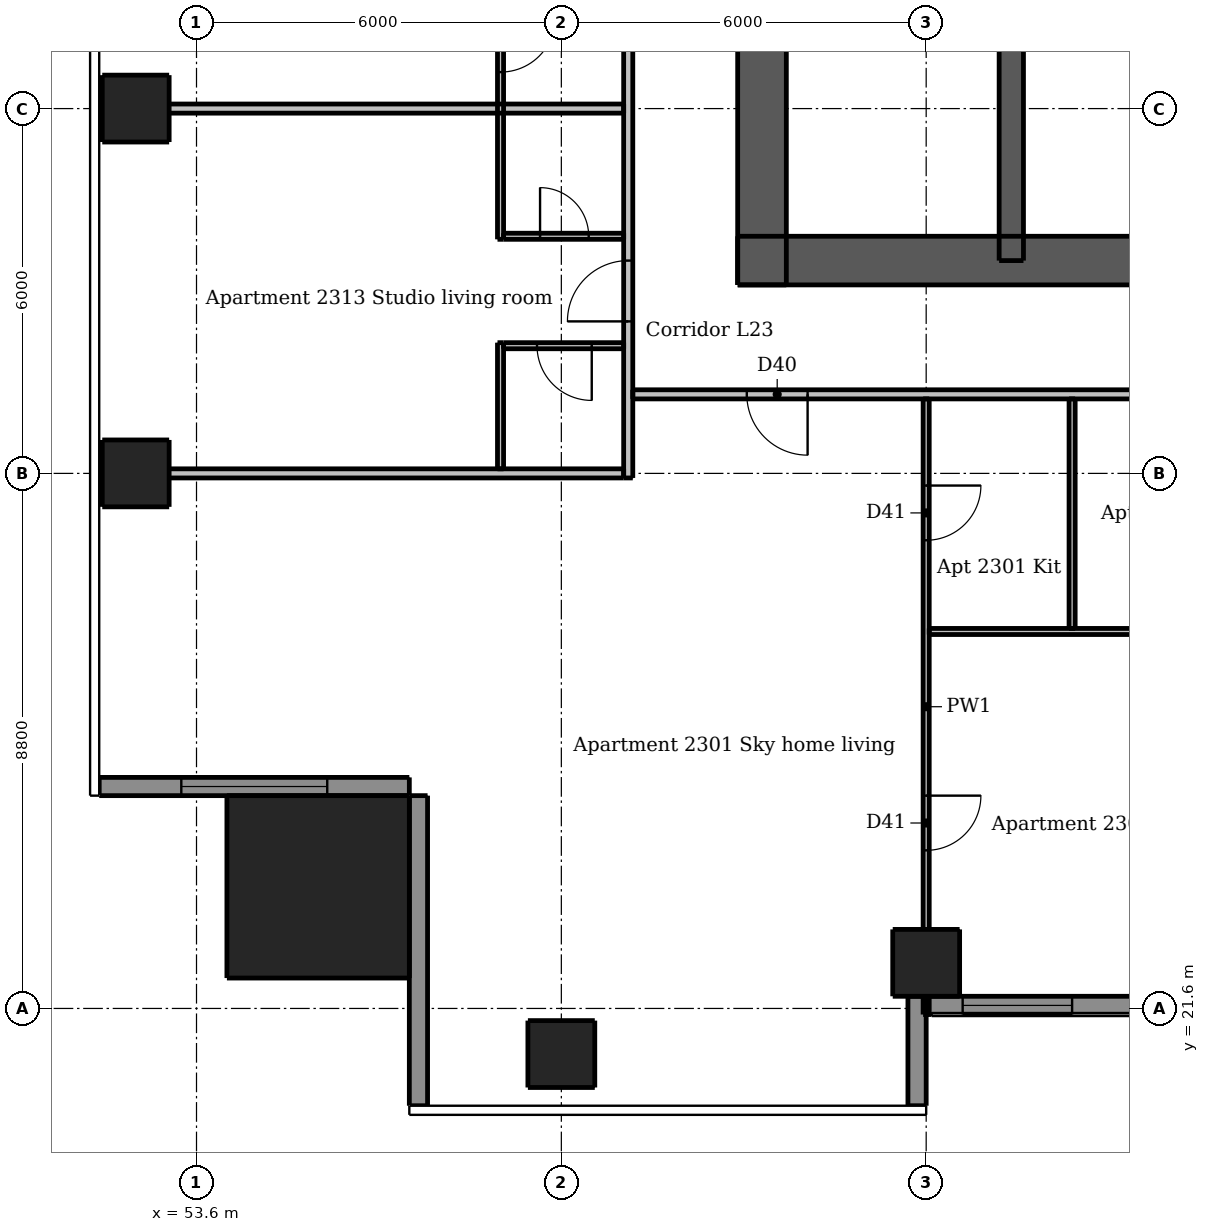
"""IFC4 building model, lengths in metres.
Left out: names, types, materials, properties, quantities, classifications, styles, units other than length and angle.
Written with IfcOpenShell. Run it as: python <this file> out.ifc"""

import sys

from ifc_helpers import new_model, si_unit, direction, frame, frame_2d, origin, origin_2d, place, context, subcontext, project, spatial, rectangle, extrude, element, fill, save


model = new_model("IFC4")
c1 = context("Model", 3, precision=1e-05, world=origin(), true_north=direction((0.0, 1.0)))
c2 = subcontext(c1, "Body", "Model", "MODEL_VIEW")
j1 = project(units=[si_unit("LENGTHUNIT", "METRE"), si_unit("PLANEANGLEUNIT", "RADIAN")], contexts=[c1])
p1 = place(None, origin())
s1 = spatial("IfcSite", under=j1, at=p1, CompositionType="ELEMENT")
p2 = place(p1, origin())
s2 = spatial("IfcBuilding", under=s1, at=p2, CompositionType="ELEMENT")
p3 = place(p2, frame((0.0, 0.0, 88.6)))
s3 = spatial("IfcBuildingStorey", under=s2, at=p3, CompositionType="ELEMENT", Elevation=88.6)
p4 = place(p3, frame((62.5, 33.9, 0.0), z_axis=(0.0, 0.0, 1.0), x_axis=(1.0, 0.0, 0.0)))
e1 = element("IfcWall", 1, at=p4, inside=s3, PredefinedType="SHEAR", context=c2, shape_type="SweptSolid", body=[
    extrude(rectangle(XDim=24.0, YDim=0.8, at=frame_2d((12.0, 0.0))), origin(), (0.0, 0.0, 1.0), 3.05),
])
p5 = place(p4, frame((2.0, 0.0, 0.0)))
e2 = element("IfcOpeningElement", 2, at=p5, cuts=e1, PredefinedType="OPENING", context=c2, shape_type="SweptSolid", body=[
    extrude(rectangle(XDim=1.1, YDim=2.1, at=frame_2d((0.55, 1.05))), frame((0.0, 0.41, 0.0), z_axis=(0.0, -1.0, 0.0), x_axis=(1.0, 0.0, 0.0)), (0.0, 0.0, 1.0), 0.82),
])
p6 = place(p4, frame((20.9, 0.0, 0.0)))
e3 = element("IfcOpeningElement", 3, at=p6, cuts=e1, PredefinedType="OPENING", context=c2, shape_type="SweptSolid", body=[
    extrude(rectangle(XDim=1.1, YDim=2.1, at=frame_2d((0.55, 1.05))), frame((0.0, 0.41, 0.0), z_axis=(0.0, -1.0, 0.0), x_axis=(1.0, 0.0, 0.0)), (0.0, 0.0, 1.0), 0.82),
])
p7 = place(p4, frame((8.0, 0.0, 0.0)))
e4 = element("IfcOpeningElement", 4, at=p7, cuts=e1, PredefinedType="OPENING", context=c2, shape_type="SweptSolid", body=[
    extrude(rectangle(XDim=1.1, YDim=2.1, at=frame_2d((0.55, 1.05))), frame((0.0, 0.41, 0.0), z_axis=(0.0, -1.0, 0.0), x_axis=(1.0, 0.0, 0.0)), (0.0, 0.0, 1.0), 0.82),
])
p8 = place(p4, frame((13.525, 0.0, 0.0)))
e5 = element("IfcOpeningElement", 5, at=p8, cuts=e1, PredefinedType="OPENING", context=c2, shape_type="SweptSolid", body=[
    extrude(rectangle(XDim=0.9, YDim=2.1, at=frame_2d((0.45, 1.05))), frame((0.0, 0.41, 0.0), z_axis=(0.0, -1.0, 0.0), x_axis=(1.0, 0.0, 0.0)), (0.0, 0.0, 1.0), 0.82),
])
p9 = place(p4, frame((17.075, 0.0, 0.0)))
e6 = element("IfcOpeningElement", 6, at=p9, cuts=e1, PredefinedType="OPENING", context=c2, shape_type="SweptSolid", body=[
    extrude(rectangle(XDim=0.9, YDim=2.1, at=frame_2d((0.45, 1.05))), frame((0.0, 0.41, 0.0), z_axis=(0.0, -1.0, 0.0), x_axis=(1.0, 0.0, 0.0)), (0.0, 0.0, 1.0), 0.82),
])
p10 = place(p3, frame((62.9, 33.5, 0.0), z_axis=(0.0, 0.0, 1.0), x_axis=(0.0, 1.0, 0.0)))
e7 = element("IfcWall", 7, at=p10, inside=s3, PredefinedType="SHEAR", context=c2, shape_type="SweptSolid", body=[
    extrude(rectangle(XDim=24.0, YDim=0.8, at=frame_2d((12.0, 0.0))), origin(), (0.0, 0.0, 1.0), 3.05),
])
p11 = place(p10, frame((11.2, 0.0, 0.0)))
e8 = element("IfcOpeningElement", 8, at=p11, cuts=e7, PredefinedType="OPENING", context=c2, shape_type="SweptSolid", body=[
    extrude(rectangle(XDim=1.6, YDim=2.1, at=frame_2d((0.8, 1.05))), frame((0.0, 0.41, 0.0), z_axis=(0.0, -1.0, 0.0), x_axis=(1.0, 0.0, 0.0)), (0.0, 0.0, 1.0), 0.82),
])
p12 = place(p3, frame((67.0, 33.9, 0.0), z_axis=(0.0, 0.0, 1.0), x_axis=(0.0, 1.0, 0.0)))
e9 = element("IfcWall", 9, at=p12, inside=s3, PredefinedType="SHEAR", context=c2, shape_type="SweptSolid", body=[
    extrude(rectangle(XDim=10.0, YDim=0.4, at=frame_2d((5.0, 0.0))), origin(), (0.0, 0.0, 1.0), 3.05),
])
p13 = place(p12, frame((0.6, 0.0, 0.0)))
e10 = element("IfcOpeningElement", 10, at=p13, cuts=e9, PredefinedType="OPENING", context=c2, shape_type="SweptSolid", body=[
    extrude(rectangle(XDim=1.1, YDim=2.1, at=frame_2d((0.55, 1.05))), frame((0.0, 0.21, 0.0), z_axis=(0.0, -1.0, 0.0), x_axis=(1.0, 0.0, 0.0)), (0.0, 0.0, 1.0), 0.42),
])
for number, where, z_axis, x_axis in (
    (11, (59.6, 20.85, 0.0), (0.0, 0.0, 1.0), (1.0, 0.0, 0.0)),
    (12, (65.6, 22.35, 0.0), (0.0, 0.0, 1.0), (1.0, 0.0, 0.0)),
    (13, (52.6, 30.4, 0.0), (0.0, 0.0, 1.0), (1.0, 0.0, 0.0)),
    (14, (52.6, 36.4, 0.0), (0.0, 0.0, 1.0), (1.0, 0.0, 0.0)),
):
    element("IfcColumn", number, at=place(p3, frame(where, z_axis=z_axis, x_axis=x_axis)), inside=s3, PredefinedType="COLUMN", context=c2, shape_type="SweptSolid", body=[
        extrude(rectangle(XDim=1.1, YDim=1.1, at=origin_2d()), origin(), (0.0, 0.0, 1.0), 3.05),
    ])
p14 = place(p3, frame((55.6, 23.6, 0.0), z_axis=(0.0, 0.0, 1.0), x_axis=(1.0, 0.0, 0.0)))
e15 = element("IfcColumn", 15, at=p14, inside=s3, PredefinedType="COLUMN", context=c2, shape_type="SweptSolid", body=[
    extrude(rectangle(XDim=3.0, YDim=3.0, at=origin_2d()), origin(), (0.0, 0.0, 1.0), 3.3),
])
p15 = place(p3, frame((65.45, 20.0, 0.0), z_axis=(0.0, 0.0, 1.0), x_axis=(0.0, 1.0, 0.0)))
e16 = element("IfcWall", 16, at=p15, inside=s3, PredefinedType="SOLIDWALL", context=c2, shape_type="SweptSolid", body=[
    extrude(rectangle(XDim=1.8, YDim=0.3, at=frame_2d((0.9, 0.0))), origin(), (0.0, 0.0, 1.0), 3.05),
])
p16 = place(p3, frame((52.0, 25.25, 0.0), z_axis=(0.0, 0.0, 1.0), x_axis=(1.0, 0.0, 0.0)))
e17 = element("IfcWall", 17, at=p16, inside=s3, PredefinedType="SOLIDWALL", context=c2, shape_type="SweptSolid", body=[
    extrude(rectangle(XDim=5.1, YDim=0.3, at=frame_2d((2.55, 0.0))), origin(), (0.0, 0.0, 1.0), 3.05),
])
p17 = place(p16, frame((1.35, 0.0, 0.15)))
e18 = element("IfcOpeningElement", 18, at=p17, cuts=e17, PredefinedType="OPENING", context=c2, shape_type="SweptSolid", body=[
    extrude(rectangle(XDim=2.4, YDim=2.1, at=frame_2d((1.2, 1.05))), frame((0.0, 0.16, 0.0), z_axis=(0.0, -1.0, 0.0), x_axis=(1.0, 0.0, 0.0)), (0.0, 0.0, 1.0), 0.32),
])
p18 = place(p3, frame((57.25, 25.1, 0.0), z_axis=(0.0, 0.0, 1.0), x_axis=(0.0, -1.0, 0.0)))
e19 = element("IfcWall", 19, at=p18, inside=s3, PredefinedType="SOLIDWALL", context=c2, shape_type="SweptSolid", body=[
    extrude(rectangle(XDim=5.1, YDim=0.3, at=frame_2d((2.55, 0.0))), origin(), (0.0, 0.0, 1.0), 3.05),
])
p19 = place(p3, frame((65.6, 21.65, 0.0), z_axis=(0.0, 0.0, 1.0), x_axis=(1.0, 0.0, 0.0)))
e20 = element("IfcWall", 20, at=p19, inside=s3, PredefinedType="SOLIDWALL", context=c2, shape_type="SweptSolid", body=[
    extrude(rectangle(XDim=5.7, YDim=0.3, at=frame_2d((2.85, 0.0))), origin(), (0.0, 0.0, 1.0), 3.05),
])
p20 = place(p19, frame((0.6, 0.0, 0.15)))
e21 = element("IfcOpeningElement", 21, at=p20, cuts=e20, PredefinedType="OPENING", context=c2, shape_type="SweptSolid", body=[
    extrude(rectangle(XDim=1.8, YDim=2.1, at=frame_2d((0.9, 1.05))), frame((0.0, 0.16, 0.0), z_axis=(0.0, -1.0, 0.0), x_axis=(1.0, 0.0, 0.0)), (0.0, 0.0, 1.0), 0.32),
])
p21 = place(p19, frame((3.6, 0.0, 0.15)))
e22 = element("IfcOpeningElement", 22, at=p21, cuts=e20, PredefinedType="OPENING", context=c2, shape_type="SweptSolid", body=[
    extrude(rectangle(XDim=1.8, YDim=2.1, at=frame_2d((0.9, 1.05))), frame((0.0, 0.16, 0.0), z_axis=(0.0, -1.0, 0.0), x_axis=(1.0, 0.0, 0.0)), (0.0, 0.0, 1.0), 0.32),
])
p22 = place(p3, frame((58.6, 30.475, 0.0), z_axis=(0.0, 0.0, 1.0), x_axis=(0.0, 1.0, 0.0)))
e23 = element("IfcWall", 23, at=p22, inside=s3, PredefinedType="PARTITIONING", context=c2, shape_type="SweptSolid", body=[
    extrude(rectangle(XDim=2.075, YDim=0.1, at=frame_2d((1.038, 0.0))), origin(), (0.0, 0.0, 1.0), 3.05),
])
p23 = place(p3, frame((58.6, 38.55, 0.0), z_axis=(0.0, 0.0, 1.0), x_axis=(0.0, -1.0, 0.0)))
e24 = element("IfcWall", 24, at=p23, inside=s3, PredefinedType="PARTITIONING", context=c2, shape_type="SweptSolid", body=[
    extrude(rectangle(XDim=4.3, YDim=0.1, at=frame_2d((2.15, 0.0))), origin(), (0.0, 0.0, 1.0), 3.05),
])
p24 = place(p23, frame((0.65, 0.0, 0.0)))
e25 = element("IfcOpeningElement", 25, at=p24, cuts=e24, PredefinedType="OPENING", context=c2, shape_type="SweptSolid", body=[
    extrude(rectangle(XDim=0.9, YDim=2.1, at=frame_2d((0.45, 1.05))), frame((0.0, 0.06, 0.0), z_axis=(0.0, -1.0, 0.0), x_axis=(1.0, 0.0, 0.0)), (0.0, 0.0, 1.0), 0.12),
])
p25 = place(p3, frame((65.6, 31.625, 0.0), z_axis=(0.0, 0.0, 1.0), x_axis=(0.0, -1.0, 0.0)))
e26 = element("IfcWall", 26, at=p25, inside=s3, PredefinedType="PARTITIONING", context=c2, shape_type="SweptSolid", body=[
    extrude(rectangle(XDim=10.125, YDim=0.1, at=frame_2d((5.062, 0.0))), origin(), (0.0, 0.0, 1.0), 2.516),
])
p26 = place(p25, frame((1.425, 0.0, 0.0)))
e27 = element("IfcOpeningElement", 27, at=p26, cuts=e26, PredefinedType="OPENING", context=c2, shape_type="SweptSolid", body=[
    extrude(rectangle(XDim=0.9, YDim=2.1, at=frame_2d((0.45, 1.05))), frame((0.0, 0.06, 0.0), z_axis=(0.0, -1.0, 0.0), x_axis=(1.0, 0.0, 0.0)), (0.0, 0.0, 1.0), 0.12),
])
p27 = place(p25, frame((6.525, 0.0, 0.0)))
e28 = element("IfcOpeningElement", 28, at=p27, cuts=e26, PredefinedType="OPENING", context=c2, shape_type="SweptSolid", body=[
    extrude(rectangle(XDim=0.9, YDim=2.1, at=frame_2d((0.45, 1.05))), frame((0.0, 0.06, 0.0), z_axis=(0.0, -1.0, 0.0), x_axis=(1.0, 0.0, 0.0)), (0.0, 0.0, 1.0), 0.12),
])
p28 = place(p3, frame((68.0, 27.85, 0.0), z_axis=(0.0, 0.0, 1.0), x_axis=(0.0, 1.0, 0.0)))
e29 = element("IfcWall", 29, at=p28, inside=s3, PredefinedType="PARTITIONING", context=c2, shape_type="SweptSolid", body=[
    extrude(rectangle(XDim=3.775, YDim=0.1, at=frame_2d((1.887, 0.0))), origin(), (0.0, 0.0, 1.0), 3.05),
])
p29 = place(p3, frame((58.65, 34.3, 0.0), z_axis=(0.0, 0.0, 1.0), x_axis=(1.0, 0.0, 0.0)))
e30 = element("IfcWall", 30, at=p29, inside=s3, PredefinedType="PARTITIONING", context=c2, shape_type="SweptSolid", body=[
    extrude(rectangle(XDim=1.975, YDim=0.1, at=frame_2d((0.988, 0.0))), origin(), (0.0, 0.0, 1.0), 3.05),
])
p30 = place(p29, frame((0.6, 0.0, 0.0)))
e31 = element("IfcOpeningElement", 31, at=p30, cuts=e30, PredefinedType="OPENING", context=c2, shape_type="SweptSolid", body=[
    extrude(rectangle(XDim=0.8, YDim=2.1, at=frame_2d((0.4, 1.05))), frame((0.0, 0.06, 0.0), z_axis=(0.0, -1.0, 0.0), x_axis=(1.0, 0.0, 0.0)), (0.0, 0.0, 1.0), 0.12),
])
p31 = place(p3, frame((60.625, 32.5, 0.0), z_axis=(0.0, 0.0, 1.0), x_axis=(-1.0, 0.0, 0.0)))
e32 = element("IfcWall", 32, at=p31, inside=s3, PredefinedType="PARTITIONING", context=c2, shape_type="SweptSolid", body=[
    extrude(rectangle(XDim=1.975, YDim=0.1, at=frame_2d((0.988, 0.0))), origin(), (0.0, 0.0, 1.0), 3.05),
])
p32 = place(p31, frame((0.525, 0.0, 0.0)))
e33 = element("IfcOpeningElement", 33, at=p32, cuts=e32, PredefinedType="OPENING", context=c2, shape_type="SweptSolid", body=[
    extrude(rectangle(XDim=0.9, YDim=2.1, at=frame_2d((0.45, 1.05))), frame((0.0, 0.06, 0.0), z_axis=(0.0, -1.0, 0.0), x_axis=(1.0, 0.0, 0.0)), (0.0, 0.0, 1.0), 0.12),
])
p33 = place(p3, frame((65.65, 27.8, 0.0), z_axis=(0.0, 0.0, 1.0), x_axis=(1.0, 0.0, 0.0)))
e34 = element("IfcWall", 34, at=p33, inside=s3, PredefinedType="PARTITIONING", context=c2, shape_type="SweptSolid", body=[
    extrude(rectangle(XDim=5.875, YDim=0.1, at=frame_2d((2.938, 0.0))), origin(), (0.0, 0.0, 1.0), 3.05),
])
p34 = place(p33, frame((3.75, 0.0, 0.0)))
e35 = element("IfcOpeningElement", 35, at=p34, cuts=e34, PredefinedType="OPENING", context=c2, shape_type="SweptSolid", body=[
    extrude(rectangle(XDim=0.8, YDim=2.1, at=frame_2d((0.4, 1.05))), frame((0.0, 0.06, 0.0), z_axis=(0.0, -1.0, 0.0), x_axis=(1.0, 0.0, 0.0)), (0.0, 0.0, 1.0), 0.12),
])
p35 = place(p3, frame((60.7, 30.325, 0.0), z_axis=(0.0, 0.0, 1.0), x_axis=(0.0, 1.0, 0.0)))
e36 = element("IfcWall", 36, at=p35, inside=s3, PredefinedType="PARTITIONING", context=c2, shape_type="SweptSolid", body=[
    extrude(rectangle(XDim=28.9, YDim=0.15, at=frame_2d((14.45, 0.0))), origin(), (0.0, 0.0, 1.0), 3.05),
])
p36 = place(p35, frame((2.575, 0.0, 0.0)))
e37 = element("IfcOpeningElement", 37, at=p36, cuts=e36, PredefinedType="OPENING", context=c2, shape_type="SweptSolid", body=[
    extrude(rectangle(XDim=1.0, YDim=2.1, at=frame_2d((0.5, 1.05))), frame((0.0, 0.085, 0.0), z_axis=(0.0, -1.0, 0.0), x_axis=(1.0, 0.0, 0.0)), (0.0, 0.0, 1.0), 0.17),
])
p37 = place(p35, frame((8.575, 0.0, 0.0)))
e38 = element("IfcOpeningElement", 38, at=p37, cuts=e36, PredefinedType="OPENING", context=c2, shape_type="SweptSolid", body=[
    extrude(rectangle(XDim=1.0, YDim=2.1, at=frame_2d((0.5, 1.05))), frame((0.0, 0.085, 0.0), z_axis=(0.0, -1.0, 0.0), x_axis=(1.0, 0.0, 0.0)), (0.0, 0.0, 1.0), 0.17),
])
p38 = place(p35, frame((14.575, 0.0, 0.0)))
e39 = element("IfcOpeningElement", 39, at=p38, cuts=e36, PredefinedType="OPENING", context=c2, shape_type="SweptSolid", body=[
    extrude(rectangle(XDim=1.0, YDim=2.1, at=frame_2d((0.5, 1.05))), frame((0.0, 0.085, 0.0), z_axis=(0.0, -1.0, 0.0), x_axis=(1.0, 0.0, 0.0)), (0.0, 0.0, 1.0), 0.17),
])
p39 = place(p35, frame((26.025, 0.0, 0.0)))
e40 = element("IfcOpeningElement", 40, at=p39, cuts=e36, PredefinedType="OPENING", context=c2, shape_type="SweptSolid", body=[
    extrude(rectangle(XDim=1.0, YDim=2.1, at=frame_2d((0.5, 1.05))), frame((0.0, 0.085, 0.0), z_axis=(0.0, -1.0, 0.0), x_axis=(1.0, 0.0, 0.0)), (0.0, 0.0, 1.0), 0.17),
])
p40 = place(p3, frame((52.0, 36.4, 0.0), z_axis=(0.0, 0.0, 1.0), x_axis=(1.0, 0.0, 0.0)))
e41 = element("IfcWall", 41, at=p40, inside=s3, PredefinedType="PARTITIONING", context=c2, shape_type="SweptSolid", body=[
    extrude(rectangle(XDim=8.625, YDim=0.15, at=frame_2d((4.312, 0.0))), origin(), (0.0, 0.0, 1.0), 2.516),
])
p41 = place(p3, frame((89.525, 31.7, 0.0), z_axis=(0.0, 0.0, 1.0), x_axis=(-1.0, 0.0, 0.0)))
e42 = element("IfcWall", 42, at=p41, inside=s3, PredefinedType="PARTITIONING", context=c2, shape_type="SweptSolid", body=[
    extrude(rectangle(XDim=28.75, YDim=0.15, at=frame_2d((14.375, 0.0))), origin(), (0.0, 0.0, 1.0), 3.05),
])
p42 = place(p41, frame((25.875, 0.0, 0.0)))
e43 = element("IfcOpeningElement", 43, at=p42, cuts=e42, PredefinedType="OPENING", context=c2, shape_type="SweptSolid", body=[
    extrude(rectangle(XDim=1.0, YDim=2.1, at=frame_2d((0.5, 1.05))), frame((0.0, 0.085, 0.0), z_axis=(0.0, -1.0, 0.0), x_axis=(1.0, 0.0, 0.0)), (0.0, 0.0, 1.0), 0.17),
])
p43 = place(p41, frame((14.425, 0.0, 0.0)))
e44 = element("IfcOpeningElement", 44, at=p43, cuts=e42, PredefinedType="OPENING", context=c2, shape_type="SweptSolid", body=[
    extrude(rectangle(XDim=1.0, YDim=2.1, at=frame_2d((0.5, 1.05))), frame((0.0, 0.085, 0.0), z_axis=(0.0, -1.0, 0.0), x_axis=(1.0, 0.0, 0.0)), (0.0, 0.0, 1.0), 0.17),
])
p44 = place(p41, frame((8.425, 0.0, 0.0)))
e45 = element("IfcOpeningElement", 45, at=p44, cuts=e42, PredefinedType="OPENING", context=c2, shape_type="SweptSolid", body=[
    extrude(rectangle(XDim=1.0, YDim=2.1, at=frame_2d((0.5, 1.05))), frame((0.0, 0.085, 0.0), z_axis=(0.0, -1.0, 0.0), x_axis=(1.0, 0.0, 0.0)), (0.0, 0.0, 1.0), 0.17),
])
p45 = place(p41, frame((2.425, 0.0, 0.0)))
e46 = element("IfcOpeningElement", 46, at=p45, cuts=e42, PredefinedType="OPENING", context=c2, shape_type="SweptSolid", body=[
    extrude(rectangle(XDim=1.0, YDim=2.1, at=frame_2d((0.5, 1.05))), frame((0.0, 0.085, 0.0), z_axis=(0.0, -1.0, 0.0), x_axis=(1.0, 0.0, 0.0)), (0.0, 0.0, 1.0), 0.17),
])
p46 = place(p3, frame((52.0, 30.4, 0.0), z_axis=(0.0, 0.0, 1.0), x_axis=(1.0, 0.0, 0.0)))
e47 = element("IfcWall", 47, at=p46, inside=s3, PredefinedType="PARTITIONING", context=c2, shape_type="SweptSolid", body=[
    extrude(rectangle(XDim=8.625, YDim=0.15, at=frame_2d((4.312, 0.0))), origin(), (0.0, 0.0, 1.0), 2.647),
])
p47 = place(p17, origin())
e48 = element("IfcWindow", 48, at=p47, inside=s3, PartitioningType="DOUBLE_PANEL_VERTICAL", PredefinedType="WINDOW", context=c2, shape_type="SweptSolid", body=[
    extrude(rectangle(XDim=2.4, YDim=2.1, at=frame_2d((1.2, 1.05))), frame((0.0, 0.03, 0.0), z_axis=(0.0, -1.0, 0.0), x_axis=(1.0, 0.0, 0.0)), (0.0, 0.0, 1.0), 0.06),
])
fill(e18, e48)
p48 = place(p20, origin())
e49 = element("IfcWindow", 49, at=p48, inside=s3, PartitioningType="DOUBLE_PANEL_VERTICAL", PredefinedType="WINDOW", context=c2, shape_type="SweptSolid", body=[
    extrude(rectangle(XDim=1.8, YDim=2.1, at=frame_2d((0.9, 1.05))), frame((0.0, 0.03, 0.0), z_axis=(0.0, -1.0, 0.0), x_axis=(1.0, 0.0, 0.0)), (0.0, 0.0, 1.0), 0.06),
])
fill(e21, e49)
p49 = place(p5, origin())
e50 = element("IfcDoor", 50, at=p49, inside=s3, OperationType="SINGLE_SWING_LEFT", PredefinedType="DOOR", context=c2, shape_type="SweptSolid", body=[
    extrude(rectangle(XDim=1.1, YDim=2.1, at=frame_2d((0.55, 1.05))), frame((0.0, 0.388, 0.0), z_axis=(0.0, -1.0, 0.0), x_axis=(1.0, 0.0, 0.0)), (0.0, 0.0, 1.0), 0.05),
])
fill(e2, e50)
p50 = place(p13, origin())
e51 = element("IfcDoor", 51, at=p50, inside=s3, OperationType="SINGLE_SWING_RIGHT", PredefinedType="DOOR", context=c2, shape_type="SweptSolid", body=[
    extrude(rectangle(XDim=1.1, YDim=2.1, at=frame_2d((0.55, 1.05))), frame((0.0, -0.138, 0.0), z_axis=(0.0, -1.0, 0.0), x_axis=(1.0, 0.0, 0.0)), (0.0, 0.0, 1.0), 0.05),
])
fill(e10, e51)
p51 = place(p42, origin())
e52 = element("IfcDoor", 52, at=p51, inside=s3, OperationType="SINGLE_SWING_LEFT", PredefinedType="DOOR", context=c2, shape_type="SweptSolid", body=[
    extrude(rectangle(XDim=1.0, YDim=2.1, at=frame_2d((0.5, 1.05))), frame((0.0, 0.025, 0.0), z_axis=(0.0, -1.0, 0.0), x_axis=(1.0, 0.0, 0.0)), (0.0, 0.0, 1.0), 0.05),
])
fill(e43, e52)
p52 = place(p26, origin())
e53 = element("IfcDoor", 53, at=p52, inside=s3, OperationType="SINGLE_SWING_LEFT", PredefinedType="DOOR", context=c2, shape_type="SweptSolid", body=[
    extrude(rectangle(XDim=0.9, YDim=2.1, at=frame_2d((0.45, 1.05))), frame((0.0, 0.025, 0.0), z_axis=(0.0, -1.0, 0.0), x_axis=(1.0, 0.0, 0.0)), (0.0, 0.0, 1.0), 0.05),
])
fill(e27, e53)
p53 = place(p27, origin())
e54 = element("IfcDoor", 54, at=p53, inside=s3, OperationType="SINGLE_SWING_LEFT", PredefinedType="DOOR", context=c2, shape_type="SweptSolid", body=[
    extrude(rectangle(XDim=0.9, YDim=2.1, at=frame_2d((0.45, 1.05))), frame((0.0, 0.025, 0.0), z_axis=(0.0, -1.0, 0.0), x_axis=(1.0, 0.0, 0.0)), (0.0, 0.0, 1.0), 0.05),
])
fill(e28, e54)
p54 = place(p36, origin())
e55 = element("IfcDoor", 55, at=p54, inside=s3, OperationType="SINGLE_SWING_LEFT", PredefinedType="DOOR", context=c2, shape_type="SweptSolid", body=[
    extrude(rectangle(XDim=1.0, YDim=2.1, at=frame_2d((0.5, 1.05))), frame((0.0, 0.025, 0.0), z_axis=(0.0, -1.0, 0.0), x_axis=(1.0, 0.0, 0.0)), (0.0, 0.0, 1.0), 0.05),
])
fill(e37, e55)
p55 = place(p32, origin())
e56 = element("IfcDoor", 56, at=p55, inside=s3, OperationType="SINGLE_SWING_LEFT", PredefinedType="DOOR", context=c2, shape_type="SweptSolid", body=[
    extrude(rectangle(XDim=0.9, YDim=2.1, at=frame_2d((0.45, 1.05))), frame((0.0, 0.025, 0.0), z_axis=(0.0, -1.0, 0.0), x_axis=(1.0, 0.0, 0.0)), (0.0, 0.0, 1.0), 0.05),
])
fill(e33, e56)
p56 = place(p30, origin())
e57 = element("IfcDoor", 57, at=p56, inside=s3, OperationType="SINGLE_SWING_LEFT", PredefinedType="DOOR", context=c2, shape_type="SweptSolid", body=[
    extrude(rectangle(XDim=0.8, YDim=2.1, at=frame_2d((0.4, 1.05))), frame((0.0, 0.025, 0.0), z_axis=(0.0, -1.0, 0.0), x_axis=(1.0, 0.0, 0.0)), (0.0, 0.0, 1.0), 0.05),
])
fill(e31, e57)
p57 = place(p24, origin())
e58 = element("IfcDoor", 58, at=p57, inside=s3, OperationType="SINGLE_SWING_LEFT", PredefinedType="DOOR", context=c2, shape_type="SweptSolid", body=[
    extrude(rectangle(XDim=0.9, YDim=2.1, at=frame_2d((0.45, 1.05))), frame((0.0, 0.025, 0.0), z_axis=(0.0, -1.0, 0.0), x_axis=(1.0, 0.0, 0.0)), (0.0, 0.0, 1.0), 0.05),
])
fill(e25, e58)
save(model, sys.argv[1])
